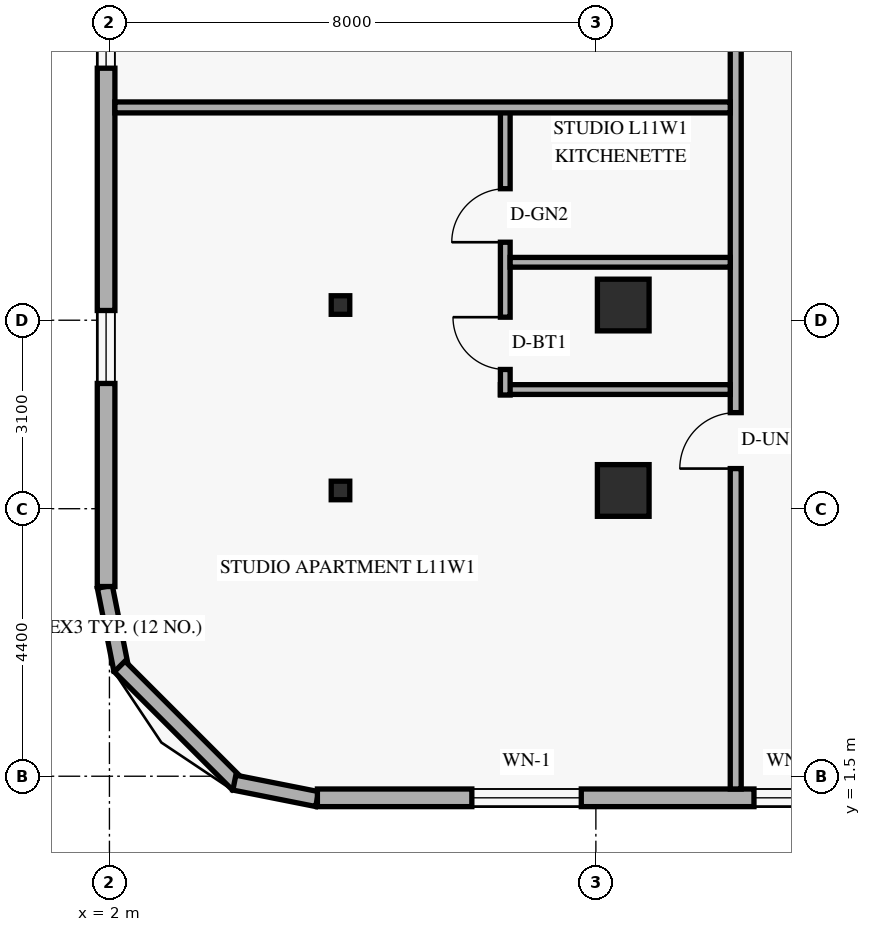
"""IFC4 building model, lengths in metres.
Left out: names, types, materials, properties, quantities, classifications, styles, units other than length and angle.
Written with IfcOpenShell. Run it as: python <this file> out.ifc"""

import sys

from ifc_helpers import new_model, si_unit, direction, frame, frame_2d, origin, origin_2d, place, context, subcontext, project, spatial, rectangle, hollow_rectangle, extrude, element, fill, save


model = new_model("IFC4")
c1 = context("Model", 3, precision=1e-05, world=origin(), true_north=direction((0.0, 1.0)))
c2 = subcontext(c1, "Body", "Model", "MODEL_VIEW")
j1 = project(units=[si_unit("LENGTHUNIT", "METRE"), si_unit("PLANEANGLEUNIT", "RADIAN")], contexts=[c1])
p1 = place(None, origin())
s1 = spatial("IfcSite", under=j1, at=p1, CompositionType="ELEMENT")
p2 = place(p1, origin())
s2 = spatial("IfcBuilding", under=s1, at=p2, CompositionType="ELEMENT")
p3 = place(p2, frame((0.0, 0.0, 45.6)))
s3 = spatial("IfcBuildingStorey", under=s2, at=p3, CompositionType="ELEMENT", Elevation=45.6)
for number, where, z_axis, x_axis in (
    (1, (5.8, 6.2, 0.0), (0.0, 0.0, 1.0), (1.0, 0.0, 0.0)),
    (2, (5.8, 9.25, 0.0), (0.0, 0.0, 1.0), (1.0, 0.0, 0.0)),
):
    element("IfcColumn", number, at=place(p3, frame(where, z_axis=z_axis, x_axis=x_axis)), inside=s3, PredefinedType="COLUMN", context=c2, shape_type="SweptSolid", body=[
        extrude(hollow_rectangle(XDim=0.305, YDim=0.305, WallThickness=0.013, at=origin_2d()), origin(), (0.0, 0.0, 1.0), 3.6),
    ])
for number, where, z_axis, x_axis in (
    (3, (10.45, 6.2, 0.0), (0.0, 0.0, 1.0), (1.0, 0.0, 0.0)),
    (4, (10.45, 9.25, 0.0), (0.0, 0.0, 1.0), (1.0, 0.0, 0.0)),
):
    element("IfcColumn", number, at=place(p3, frame(where, z_axis=z_axis, x_axis=x_axis)), inside=s3, PredefinedType="COLUMN", context=c2, shape_type="SweptSolid", body=[
        extrude(rectangle(XDim=0.85, YDim=0.85, at=origin_2d()), origin(), (0.0, 0.0, 1.0), 3.6),
    ])
p4 = place(p3, frame((1.924, 4.616, 0.0), z_axis=(0.0, 0.0, 1.0), x_axis=(0.19496651342, -0.980809899341, 0.0)))
e5 = element("IfcWall", 5, at=p4, inside=s3, PredefinedType="SOLIDWALL", context=c2, shape_type="SweptSolid", body=[
    extrude(rectangle(XDim=1.389, YDim=0.25, at=frame_2d((0.694, 0.0))), origin(), (0.0, 0.0, 1.0), 3.36),
])
p5 = place(p3, frame((2.168, 3.305, 0.0), z_axis=(0.0, 0.0, 1.0), x_axis=(0.707106781187, -0.707106781187, 0.0)))
e6 = element("IfcWall", 6, at=p5, inside=s3, PredefinedType="SOLIDWALL", context=c2, shape_type="SweptSolid", body=[
    extrude(rectangle(XDim=2.739, YDim=0.25, at=frame_2d((1.37, 0.0))), origin(), (0.0, 0.0, 1.0), 3.36),
])
p6 = place(p3, frame((4.054, 1.395, 0.0), z_axis=(0.0, 0.0, 1.0), x_axis=(0.980809899341, -0.19496651342, 0.0)))
e7 = element("IfcWall", 7, at=p6, inside=s3, PredefinedType="SOLIDWALL", context=c2, shape_type="SweptSolid", body=[
    extrude(rectangle(XDim=1.389, YDim=0.25, at=frame_2d((0.694, 0.0))), origin(), (0.0, 0.0, 1.0), 3.36),
])
p7 = place(p3, frame((5.42, 1.145, 0.0), z_axis=(0.0, 0.0, 1.0), x_axis=(1.0, 0.0, 0.0)))
e8 = element("IfcWall", 8, at=p7, inside=s3, PredefinedType="SOLIDWALL", context=c2, shape_type="SweptSolid", body=[
    extrude(rectangle(XDim=39.56, YDim=0.29, at=frame_2d((19.78, 0.0))), origin(), (0.0, 0.0, 1.0), 3.36),
])
p8 = place(p7, frame((2.54, 0.0, 0.85)))
e9 = element("IfcOpeningElement", 9, at=p8, cuts=e8, PredefinedType="OPENING", context=c2, shape_type="SweptSolid", body=[
    extrude(rectangle(XDim=1.8, YDim=1.6, at=frame_2d((0.9, 0.8))), frame((0.0, 0.155, 0.0), z_axis=(0.0, -1.0, 0.0), x_axis=(1.0, 0.0, 0.0)), (0.0, 0.0, 1.0), 0.31),
])
p9 = place(p7, frame((7.18, 0.0, 0.85)))
e10 = element("IfcOpeningElement", 10, at=p9, cuts=e8, PredefinedType="OPENING", context=c2, shape_type="SweptSolid", body=[
    extrude(rectangle(XDim=1.2, YDim=1.5, at=frame_2d((0.6, 0.75))), frame((0.0, 0.155, 0.0), z_axis=(0.0, -1.0, 0.0), x_axis=(1.0, 0.0, 0.0)), (0.0, 0.0, 1.0), 0.31),
])
p10 = place(p7, frame((12.257, 0.0, 0.85)))
e11 = element("IfcOpeningElement", 11, at=p10, cuts=e8, PredefinedType="OPENING", context=c2, shape_type="SweptSolid", body=[
    extrude(rectangle(XDim=1.8, YDim=1.6, at=frame_2d((0.9, 0.8))), frame((0.0, 0.155, 0.0), z_axis=(0.0, -1.0, 0.0), x_axis=(1.0, 0.0, 0.0)), (0.0, 0.0, 1.0), 0.31),
])
p11 = place(p7, frame((20.847, 0.0, 0.85)))
e12 = element("IfcOpeningElement", 12, at=p11, cuts=e8, PredefinedType="OPENING", context=c2, shape_type="SweptSolid", body=[
    extrude(rectangle(XDim=1.8, YDim=1.6, at=frame_2d((0.9, 0.8))), frame((0.0, 0.155, 0.0), z_axis=(0.0, -1.0, 0.0), x_axis=(1.0, 0.0, 0.0)), (0.0, 0.0, 1.0), 0.31),
])
p12 = place(p7, frame((27.03, 0.0, 0.85)))
e13 = element("IfcOpeningElement", 13, at=p12, cuts=e8, PredefinedType="OPENING", context=c2, shape_type="SweptSolid", body=[
    extrude(rectangle(XDim=1.8, YDim=1.6, at=frame_2d((0.9, 0.8))), frame((0.0, 0.155, 0.0), z_axis=(0.0, -1.0, 0.0), x_axis=(1.0, 0.0, 0.0)), (0.0, 0.0, 1.0), 0.31),
])
p13 = place(p7, frame((30.465, 0.0, 0.85)))
e14 = element("IfcOpeningElement", 14, at=p13, cuts=e8, PredefinedType="OPENING", context=c2, shape_type="SweptSolid", body=[
    extrude(rectangle(XDim=1.2, YDim=1.5, at=frame_2d((0.6, 0.75))), frame((0.0, 0.155, 0.0), z_axis=(0.0, -1.0, 0.0), x_axis=(1.0, 0.0, 0.0)), (0.0, 0.0, 1.0), 0.31),
])
p14 = place(p7, frame((34.945, 0.0, 0.85)))
e15 = element("IfcOpeningElement", 15, at=p14, cuts=e8, PredefinedType="OPENING", context=c2, shape_type="SweptSolid", body=[
    extrude(rectangle(XDim=1.8, YDim=1.6, at=frame_2d((0.9, 0.8))), frame((0.0, 0.155, 0.0), z_axis=(0.0, -1.0, 0.0), x_axis=(1.0, 0.0, 0.0)), (0.0, 0.0, 1.0), 0.31),
])
p15 = place(p3, frame((1.945, 43.38, 0.0), z_axis=(0.0, 0.0, 1.0), x_axis=(0.0, -1.0, 0.0)))
e16 = element("IfcWall", 16, at=p15, inside=s3, PredefinedType="SOLIDWALL", context=c2, shape_type="SweptSolid", body=[
    extrude(rectangle(XDim=38.76, YDim=0.29, at=frame_2d((19.38, 0.0))), origin(), (0.0, 0.0, 1.0), 3.36),
])
p16 = place(p15, frame((34.22, 0.0, 0.85)))
e17 = element("IfcOpeningElement", 17, at=p16, cuts=e16, PredefinedType="OPENING", context=c2, shape_type="SweptSolid", body=[
    extrude(rectangle(XDim=1.2, YDim=1.5, at=frame_2d((0.6, 0.75))), frame((0.0, 0.155, 0.0), z_axis=(0.0, -1.0, 0.0), x_axis=(1.0, 0.0, 0.0)), (0.0, 0.0, 1.0), 0.31),
])
p17 = place(p15, frame((29.035, 0.0, 0.85)))
e18 = element("IfcOpeningElement", 18, at=p17, cuts=e16, PredefinedType="OPENING", context=c2, shape_type="SweptSolid", body=[
    extrude(rectangle(XDim=1.2, YDim=1.5, at=frame_2d((0.6, 0.75))), frame((0.0, 0.155, 0.0), z_axis=(0.0, -1.0, 0.0), x_axis=(1.0, 0.0, 0.0)), (0.0, 0.0, 1.0), 0.31),
])
p18 = place(p15, frame((24.415, 0.0, 0.85)))
e19 = element("IfcOpeningElement", 19, at=p18, cuts=e16, PredefinedType="OPENING", context=c2, shape_type="SweptSolid", body=[
    extrude(rectangle(XDim=1.2, YDim=1.5, at=frame_2d((0.6, 0.75))), frame((0.0, 0.155, 0.0), z_axis=(0.0, -1.0, 0.0), x_axis=(1.0, 0.0, 0.0)), (0.0, 0.0, 1.0), 0.31),
])
p19 = place(p15, frame((19.22, 0.0, 0.85)))
e20 = element("IfcOpeningElement", 20, at=p19, cuts=e16, PredefinedType="OPENING", context=c2, shape_type="SweptSolid", body=[
    extrude(rectangle(XDim=1.2, YDim=1.5, at=frame_2d((0.6, 0.75))), frame((0.0, 0.155, 0.0), z_axis=(0.0, -1.0, 0.0), x_axis=(1.0, 0.0, 0.0)), (0.0, 0.0, 1.0), 0.31),
])
p20 = place(p15, frame((13.415, 0.0, 0.85)))
e21 = element("IfcOpeningElement", 21, at=p20, cuts=e16, PredefinedType="OPENING", context=c2, shape_type="SweptSolid", body=[
    extrude(rectangle(XDim=1.2, YDim=1.5, at=frame_2d((0.6, 0.75))), frame((0.0, 0.155, 0.0), z_axis=(0.0, -1.0, 0.0), x_axis=(1.0, 0.0, 0.0)), (0.0, 0.0, 1.0), 0.31),
])
p21 = place(p15, frame((7.435, 0.0, 0.85)))
e22 = element("IfcOpeningElement", 22, at=p21, cuts=e16, PredefinedType="OPENING", context=c2, shape_type="SweptSolid", body=[
    extrude(rectangle(XDim=1.2, YDim=1.5, at=frame_2d((0.6, 0.75))), frame((0.0, 0.155, 0.0), z_axis=(0.0, -1.0, 0.0), x_axis=(1.0, 0.0, 0.0)), (0.0, 0.0, 1.0), 0.31),
])
p22 = place(p15, frame((2.42, 0.0, 0.85)))
e23 = element("IfcOpeningElement", 23, at=p22, cuts=e16, PredefinedType="OPENING", context=c2, shape_type="SweptSolid", body=[
    extrude(rectangle(XDim=1.2, YDim=1.5, at=frame_2d((0.6, 0.75))), frame((0.0, 0.155, 0.0), z_axis=(0.0, -1.0, 0.0), x_axis=(1.0, 0.0, 0.0)), (0.0, 0.0, 1.0), 0.31),
])
p23 = place(p3, frame((12.3, 1.29, 0.0), z_axis=(0.0, 0.0, 1.0), x_axis=(0.0, 1.0, 0.0)))
e24 = element("IfcWall", 24, at=p23, inside=s3, PredefinedType="STANDARD", context=c2, shape_type="SweptSolid", body=[
    extrude(rectangle(XDim=45.42, YDim=0.18, at=frame_2d((22.71, 0.0))), origin(), (0.0, 0.0, 1.0), 2.649),
])
p24 = place(p23, frame((5.27, 0.0, 0.0)))
e25 = element("IfcOpeningElement", 25, at=p24, cuts=e24, PredefinedType="OPENING", context=c2, shape_type="SweptSolid", body=[
    extrude(rectangle(XDim=0.92, YDim=2.15, at=frame_2d((0.46, 1.075))), frame((0.0, 0.1, 0.0), z_axis=(0.0, -1.0, 0.0), x_axis=(1.0, 0.0, 0.0)), (0.0, 0.0, 1.0), 0.2),
])
p25 = place(p23, frame((14.5, 0.0, 0.0)))
e26 = element("IfcOpeningElement", 26, at=p25, cuts=e24, PredefinedType="OPENING", context=c2, shape_type="SweptSolid", body=[
    extrude(rectangle(XDim=0.92, YDim=2.15, at=frame_2d((0.46, 1.075))), frame((0.0, 0.1, 0.0), z_axis=(0.0, -1.0, 0.0), x_axis=(1.0, 0.0, 0.0)), (0.0, 0.0, 1.0), 0.2),
])
p26 = place(p23, frame((26.082, 0.0, 0.0)))
e27 = element("IfcOpeningElement", 27, at=p26, cuts=e24, PredefinedType="OPENING", context=c2, shape_type="SweptSolid", body=[
    extrude(rectangle(XDim=0.92, YDim=2.15, at=frame_2d((0.46, 1.075))), frame((0.0, 0.1, 0.0), z_axis=(0.0, -1.0, 0.0), x_axis=(1.0, 0.0, 0.0)), (0.0, 0.0, 1.0), 0.2),
])
p27 = place(p23, frame((41.05, 0.0, 0.0)))
e28 = element("IfcOpeningElement", 28, at=p27, cuts=e24, PredefinedType="OPENING", context=c2, shape_type="SweptSolid", body=[
    extrude(rectangle(XDim=0.92, YDim=2.15, at=frame_2d((0.46, 1.075))), frame((0.0, 0.1, 0.0), z_axis=(0.0, -1.0, 0.0), x_axis=(1.0, 0.0, 0.0)), (0.0, 0.0, 1.0), 0.2),
])
p28 = place(p3, frame((8.43, 7.86, 0.0), z_axis=(0.0, 0.0, 1.0), x_axis=(1.0, 0.0, 0.0)))
e29 = element("IfcWall", 29, at=p28, inside=s3, PredefinedType="PLUMBINGWALL", context=c2, shape_type="SweptSolid", body=[
    extrude(rectangle(XDim=3.78, YDim=0.16, at=frame_2d((1.89, 0.0))), origin(), (0.0, 0.0, 1.0), 2.649),
])
p29 = place(p3, frame((8.51, 7.77, 0.0), z_axis=(0.0, 0.0, 1.0), x_axis=(0.0, 1.0, 0.0)))
e30 = element("IfcWall", 30, at=p29, inside=s3, PredefinedType="PLUMBINGWALL", context=c2, shape_type="SweptSolid", body=[
    extrude(rectangle(XDim=4.73, YDim=0.16, at=frame_2d((2.365, 0.0))), origin(), (0.0, 0.0, 1.0), 2.649),
])
p30 = place(p29, frame((0.42, 0.0, 0.0)))
e31 = element("IfcOpeningElement", 31, at=p30, cuts=e30, PredefinedType="OPENING", context=c2, shape_type="SweptSolid", body=[
    extrude(rectangle(XDim=0.86, YDim=2.12, at=frame_2d((0.43, 1.06))), frame((0.0, 0.09, 0.0), z_axis=(0.0, -1.0, 0.0), x_axis=(1.0, 0.0, 0.0)), (0.0, 0.0, 1.0), 0.18),
])
p31 = place(p29, frame((2.513, 0.0, 0.0)))
e32 = element("IfcOpeningElement", 32, at=p31, cuts=e30, PredefinedType="OPENING", context=c2, shape_type="SweptSolid", body=[
    extrude(rectangle(XDim=0.88, YDim=2.12, at=frame_2d((0.44, 1.06))), frame((0.0, 0.09, 0.0), z_axis=(0.0, -1.0, 0.0), x_axis=(1.0, 0.0, 0.0)), (0.0, 0.0, 1.0), 0.18),
])
p32 = place(p3, frame((8.59, 9.953, 0.0), z_axis=(0.0, 0.0, 1.0), x_axis=(1.0, 0.0, 0.0)))
e33 = element("IfcWall", 33, at=p32, inside=s3, PredefinedType="PLUMBINGWALL", context=c2, shape_type="SweptSolid", body=[
    extrude(rectangle(XDim=3.62, YDim=0.16, at=frame_2d((1.81, 0.0))), origin(), (0.0, 0.0, 1.0), 2.649),
])
p33 = place(p3, frame((2.09, 12.5, 0.0), z_axis=(0.0, 0.0, 1.0), x_axis=(1.0, 0.0, 0.0)))
e34 = element("IfcWall", 34, at=p33, inside=s3, PredefinedType="PARTITIONING", context=c2, shape_type="SweptSolid", body=[
    extrude(rectangle(XDim=10.12, YDim=0.18, at=frame_2d((5.06, 0.0))), origin(), (0.0, 0.0, 1.0), 2.649),
])
p34 = place(p8, origin())
e35 = element("IfcWindow", 35, at=p34, inside=s3, PartitioningType="SINGLE_PANEL", PredefinedType="WINDOW", context=c2, shape_type="SweptSolid", body=[
    extrude(rectangle(XDim=1.8, YDim=1.6, at=frame_2d((0.9, 0.8))), frame((0.0, 0.03, 0.0), z_axis=(0.0, -1.0, 0.0), x_axis=(1.0, 0.0, 0.0)), (0.0, 0.0, 1.0), 0.06),
])
fill(e9, e35)
p35 = place(p9, origin())
e36 = element("IfcWindow", 36, at=p35, inside=s3, PartitioningType="SINGLE_PANEL", PredefinedType="WINDOW", context=c2, shape_type="SweptSolid", body=[
    extrude(rectangle(XDim=1.2, YDim=1.5, at=frame_2d((0.6, 0.75))), frame((0.0, 0.03, 0.0), z_axis=(0.0, -1.0, 0.0), x_axis=(1.0, 0.0, 0.0)), (0.0, 0.0, 1.0), 0.06),
])
fill(e10, e36)
p36 = place(p16, origin())
e37 = element("IfcWindow", 37, at=p36, inside=s3, PartitioningType="SINGLE_PANEL", PredefinedType="WINDOW", context=c2, shape_type="SweptSolid", body=[
    extrude(rectangle(XDim=1.2, YDim=1.5, at=frame_2d((0.6, 0.75))), frame((0.0, 0.03, 0.0), z_axis=(0.0, -1.0, 0.0), x_axis=(1.0, 0.0, 0.0)), (0.0, 0.0, 1.0), 0.06),
])
fill(e17, e37)
p37 = place(p17, origin())
e38 = element("IfcWindow", 38, at=p37, inside=s3, PartitioningType="SINGLE_PANEL", PredefinedType="WINDOW", context=c2, shape_type="SweptSolid", body=[
    extrude(rectangle(XDim=1.2, YDim=1.5, at=frame_2d((0.6, 0.75))), frame((0.0, 0.03, 0.0), z_axis=(0.0, -1.0, 0.0), x_axis=(1.0, 0.0, 0.0)), (0.0, 0.0, 1.0), 0.06),
])
fill(e18, e38)
p38 = place(p24, origin())
e39 = element("IfcDoor", 39, at=p38, inside=s3, OperationType="SINGLE_SWING_LEFT", PredefinedType="DOOR", context=c2, shape_type="SweptSolid", body=[
    extrude(rectangle(XDim=0.92, YDim=2.15, at=frame_2d((0.46, 1.075))), frame((0.0, 0.025, 0.0), z_axis=(0.0, -1.0, 0.0), x_axis=(1.0, 0.0, 0.0)), (0.0, 0.0, 1.0), 0.05),
])
fill(e25, e39)
p39 = place(p30, origin())
e40 = element("IfcDoor", 40, at=p39, inside=s3, OperationType="SINGLE_SWING_RIGHT", PredefinedType="DOOR", context=c2, shape_type="SweptSolid", body=[
    extrude(rectangle(XDim=0.86, YDim=2.12, at=frame_2d((0.43, 1.06))), frame((0.0, 0.025, 0.0), z_axis=(0.0, -1.0, 0.0), x_axis=(1.0, 0.0, 0.0)), (0.0, 0.0, 1.0), 0.05),
])
fill(e31, e40)
p40 = place(p31, origin())
e41 = element("IfcDoor", 41, at=p40, inside=s3, OperationType="SINGLE_SWING_LEFT", PredefinedType="DOOR", context=c2, shape_type="SweptSolid", body=[
    extrude(rectangle(XDim=0.88, YDim=2.12, at=frame_2d((0.44, 1.06))), frame((0.0, 0.025, 0.0), z_axis=(0.0, -1.0, 0.0), x_axis=(1.0, 0.0, 0.0)), (0.0, 0.0, 1.0), 0.05),
])
fill(e32, e41)
save(model, sys.argv[1])
